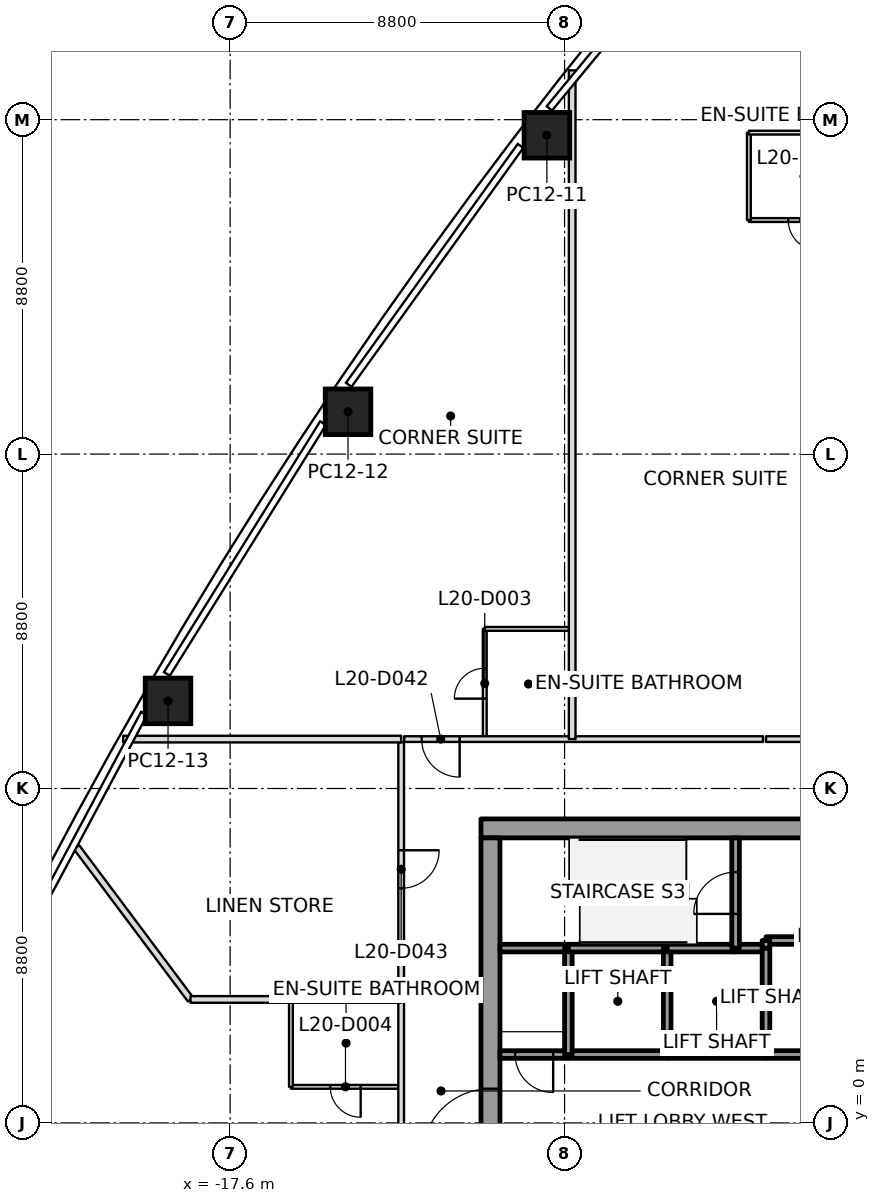
"""IFC4 building model, lengths in metres.
Left out: names, types, materials, properties, quantities, classifications, styles, units other than length and angle.
Written with IfcOpenShell. Run it as: python <this file> out.ifc"""

import sys

from ifc_helpers import new_model, si_unit, direction, frame, frame_2d, origin, origin_2d, place, context, subcontext, project, spatial, rectangle, extrude, element, fill, save


model = new_model("IFC4")
c1 = context("Model", 3, precision=1e-05, world=origin(), true_north=direction((0.0, 1.0)))
c2 = subcontext(c1, "Body", "Model", "MODEL_VIEW")
j1 = project(units=[si_unit("LENGTHUNIT", "METRE"), si_unit("PLANEANGLEUNIT", "RADIAN")], contexts=[c1])
p1 = place(None, origin())
s1 = spatial("IfcSite", under=j1, at=p1, CompositionType="ELEMENT")
p2 = place(p1, origin())
s2 = spatial("IfcBuilding", under=s1, at=p2, CompositionType="ELEMENT")
p3 = place(p2, frame((0.0, 0.0, 96.1)))
s3 = spatial("IfcBuildingStorey", under=s2, at=p3, CompositionType="ELEMENT", Elevation=96.1)
p4 = place(p3, frame((-9.265, 25.99, 0.0), z_axis=(0.00019790496, -0.022363260521, 0.999749891429), x_axis=(0.61047282483, 0.791841815333, 0.017591749055)))
e1 = element("IfcColumn", 1, at=p4, inside=s3, PredefinedType="COLUMN", context=c2, shape_type="SweptSolid", body=[
    extrude(rectangle(XDim=1.2, YDim=1.2, at=origin_2d()), origin(), (0.0, 0.0, 1.0), 3.701),
])
p5 = place(p3, frame((-14.498, 18.713, 0.0), z_axis=(0.005674016471, -0.014382971985, 0.999880460682), x_axis=(0.55645923647, 0.830828377567, 0.008793473571)))
e2 = element("IfcColumn", 2, at=p5, inside=s3, PredefinedType="COLUMN", context=c2, shape_type="SweptSolid", body=[
    extrude(rectangle(XDim=1.2, YDim=1.2, at=origin_2d()), origin(), (0.0, 0.0, 1.0), 3.7),
])
p6 = place(p3, frame((-19.234, 11.105, 0.0), z_axis=(0.010688725148, -0.006202099777, 0.999923639641), x_axis=(0.499971436973, 0.8660418936, 2.7223042e-05)))
e3 = element("IfcColumn", 3, at=p6, inside=s3, PredefinedType="COLUMN", context=c2, shape_type="SweptSolid", body=[
    extrude(rectangle(XDim=1.2, YDim=1.2, at=origin_2d()), origin(), (0.0, 0.0, 1.0), 3.7),
])
p7 = place(p3, frame((-11.0, 7.75, 0.0), z_axis=(0.0, 0.0, 1.0), x_axis=(1.0, 0.0, 0.0)))
e4 = element("IfcWall", 4, at=p7, inside=s3, PredefinedType="SHEAR", context=c2, shape_type="SweptSolid", body=[
    extrude(rectangle(XDim=22.0, YDim=0.5, at=frame_2d((11.0, 0.0))), origin(), (0.0, 0.0, 1.0), 3.7),
])
p8 = place(p7, frame((10.45, 0.0, 0.0)))
e5 = element("IfcOpeningElement", 5, at=p8, cuts=e4, PredefinedType="OPENING", context=c2, shape_type="SweptSolid", body=[
    extrude(rectangle(XDim=1.1, YDim=2.1, at=frame_2d((0.55, 1.05))), frame((0.0, 0.25, 0.0), z_axis=(0.0, -1.0, 0.0), x_axis=(1.0, 0.0, 0.0)), (0.0, 0.0, 1.0), 0.5),
])
p9 = place(p3, frame((-10.75, -7.5, 0.0), z_axis=(0.0, 0.0, 1.0), x_axis=(0.0, 1.0, 0.0)))
e6 = element("IfcWall", 6, at=p9, inside=s3, PredefinedType="SHEAR", context=c2, shape_type="SweptSolid", body=[
    extrude(rectangle(XDim=15.0, YDim=0.5, at=frame_2d((7.5, 0.0))), origin(), (0.0, 0.0, 1.0), 3.7),
])
p10 = place(p9, frame((6.6, 0.0, 0.0)))
e7 = element("IfcOpeningElement", 7, at=p10, cuts=e6, PredefinedType="OPENING", context=c2, shape_type="SweptSolid", body=[
    extrude(rectangle(XDim=1.8, YDim=2.1, at=frame_2d((0.9, 1.05))), frame((0.0, 0.25, 0.0), z_axis=(0.0, -1.0, 0.0), x_axis=(1.0, 0.0, 0.0)), (0.0, 0.0, 1.0), 0.5),
])
p11 = place(p3, frame((-8.7, 1.8, 0.0), z_axis=(0.0, 0.0, 1.0), x_axis=(-1.0, 0.0, 0.0)))
e8 = element("IfcWall", 8, at=p11, inside=s3, PredefinedType="SOLIDWALL", context=c2, shape_type="SweptSolid", body=[
    extrude(rectangle(XDim=1.8, YDim=0.2, at=frame_2d((0.9, 0.0))), origin(), (0.0, 0.0, 1.0), 3.55),
])
p12 = place(p11, frame((0.4, 0.0, 0.0)))
e9 = element("IfcOpeningElement", 9, at=p12, cuts=e8, PredefinedType="OPENING", context=c2, shape_type="SweptSolid", body=[
    extrude(rectangle(XDim=1.0, YDim=2.1, at=frame_2d((0.5, 1.05))), frame((0.0, 0.1, 0.0), z_axis=(0.0, -1.0, 0.0), x_axis=(1.0, 0.0, 0.0)), (0.0, 0.0, 1.0), 0.2),
])
p13 = place(p3, frame((-8.7, 4.6, 0.0), z_axis=(0.0, 0.0, 1.0), x_axis=(-1.0, 0.0, 0.0)))
e10 = element("IfcWall", 10, at=p13, inside=s3, PredefinedType="SOLIDWALL", context=c2, shape_type="SweptSolid", body=[
    extrude(rectangle(XDim=1.8, YDim=0.2, at=frame_2d((0.9, 0.0))), origin(), (0.0, 0.0, 1.0), 3.55),
])
p14 = place(p3, frame((-6.1, 1.8, 0.0), z_axis=(0.0, 0.0, 1.0), x_axis=(-1.0, 0.0, 0.0)))
e11 = element("IfcWall", 11, at=p14, inside=s3, PredefinedType="SOLIDWALL", context=c2, shape_type="SweptSolid", body=[
    extrude(rectangle(XDim=2.6, YDim=0.2, at=frame_2d((1.3, 0.0))), origin(), (0.0, 0.0, 1.0), 3.55),
])
p15 = place(p3, frame((-8.7, 1.8, 0.0), z_axis=(0.0, 0.0, 1.0), x_axis=(0.0, 1.0, 0.0)))
e12 = element("IfcWall", 12, at=p15, inside=s3, PredefinedType="SOLIDWALL", context=c2, shape_type="SweptSolid", body=[
    extrude(rectangle(XDim=2.8, YDim=0.2, at=frame_2d((1.4, 0.0))), origin(), (0.0, 0.0, 1.0), 3.55),
])
p16 = place(p3, frame((-6.1, 4.6, 0.0), z_axis=(0.0, 0.0, 1.0), x_axis=(-1.0, 0.0, 0.0)))
e13 = element("IfcWall", 13, at=p16, inside=s3, PredefinedType="SOLIDWALL", context=c2, shape_type="SweptSolid", body=[
    extrude(rectangle(XDim=2.6, YDim=0.2, at=frame_2d((1.3, 0.0))), origin(), (0.0, 0.0, 1.0), 3.55),
])
p17 = place(p3, frame((-3.5, 1.8, 0.0), z_axis=(0.0, 0.0, 1.0), x_axis=(-1.0, 0.0, 0.0)))
e14 = element("IfcWall", 14, at=p17, inside=s3, PredefinedType="SOLIDWALL", context=c2, shape_type="SweptSolid", body=[
    extrude(rectangle(XDim=2.6, YDim=0.2, at=frame_2d((1.3, 0.0))), origin(), (0.0, 0.0, 1.0), 3.55),
])
p18 = place(p3, frame((-6.1, 1.8, 0.0), z_axis=(0.0, 0.0, 1.0), x_axis=(0.0, 1.0, 0.0)))
e15 = element("IfcWall", 15, at=p18, inside=s3, PredefinedType="SOLIDWALL", context=c2, shape_type="SweptSolid", body=[
    extrude(rectangle(XDim=2.8, YDim=0.2, at=frame_2d((1.4, 0.0))), origin(), (0.0, 0.0, 1.0), 3.55),
])
p19 = place(p3, frame((-4.3, 4.6, 0.0), z_axis=(0.0, 0.0, 1.0), x_axis=(-1.0, 0.0, 0.0)))
e16 = element("IfcWall", 16, at=p19, inside=s3, PredefinedType="SOLIDWALL", context=c2, shape_type="SweptSolid", body=[
    extrude(rectangle(XDim=1.8, YDim=0.2, at=frame_2d((0.9, 0.0))), origin(), (0.0, 0.0, 1.0), 3.55),
])
p20 = place(p3, frame((-3.5, 4.6, 0.0), z_axis=(0.0, 0.0, 1.0), x_axis=(-1.0, 0.0, 0.0)))
e17 = element("IfcWall", 17, at=p20, inside=s3, PredefinedType="SOLIDWALL", context=c2, shape_type="SweptSolid", body=[
    extrude(rectangle(XDim=0.8, YDim=0.2, at=frame_2d((0.4, 0.0))), origin(), (0.0, 0.0, 1.0), 3.55),
])
p21 = place(p3, frame((-4.3, 4.6, 0.0), z_axis=(0.0, 0.0, 1.0), x_axis=(0.0, 1.0, 0.0)))
e18 = element("IfcWall", 18, at=p21, inside=s3, PredefinedType="SOLIDWALL", context=c2, shape_type="SweptSolid", body=[
    extrude(rectangle(XDim=2.9, YDim=0.2, at=frame_2d((1.45, 0.0))), origin(), (0.0, 0.0, 1.0), 3.55),
])
p22 = place(p21, frame((0.9, 0.0, 0.0)))
e19 = element("IfcOpeningElement", 19, at=p22, cuts=e18, PredefinedType="OPENING", context=c2, shape_type="SweptSolid", body=[
    extrude(rectangle(XDim=1.1, YDim=2.1, at=frame_2d((0.55, 1.05))), frame((0.0, 0.1, 0.0), z_axis=(0.0, -1.0, 0.0), x_axis=(1.0, 0.0, 0.0)), (0.0, 0.0, 1.0), 0.2),
])
p23 = place(p3, frame((-0.9, 1.8, 0.0), z_axis=(0.0, 0.0, 1.0), x_axis=(-1.0, 0.0, 0.0)))
e20 = element("IfcWall", 20, at=p23, inside=s3, PredefinedType="SOLIDWALL", context=c2, shape_type="SweptSolid", body=[
    extrude(rectangle(XDim=2.6, YDim=0.2, at=frame_2d((1.3, 0.0))), origin(), (0.0, 0.0, 1.0), 3.55),
])
p24 = place(p3, frame((-3.5, 4.6, 0.0), z_axis=(0.0, 0.0, 1.0), x_axis=(0.0, -1.0, 0.0)))
e21 = element("IfcWall", 21, at=p24, inside=s3, PredefinedType="SOLIDWALL", context=c2, shape_type="SweptSolid", body=[
    extrude(rectangle(XDim=2.8, YDim=0.2, at=frame_2d((1.4, 0.0))), origin(), (0.0, 0.0, 1.0), 3.55),
])
p25 = place(p3, frame((-0.9, 4.8, 0.0), z_axis=(0.0, 0.0, 1.0), x_axis=(-1.0, 0.0, 0.0)))
e22 = element("IfcWall", 22, at=p25, inside=s3, PredefinedType="SOLIDWALL", context=c2, shape_type="SweptSolid", body=[
    extrude(rectangle(XDim=2.6, YDim=0.2, at=frame_2d((1.3, 0.0))), origin(), (0.0, 0.0, 1.0), 3.55),
])
p26 = place(p3, frame((-3.5, 4.8, 0.0), z_axis=(0.0, 0.0, 1.0), x_axis=(0.0, -1.0, 0.0)))
e23 = element("IfcWall", 23, at=p26, inside=s3, PredefinedType="SOLIDWALL", context=c2, shape_type="SweptSolid", body=[
    extrude(rectangle(XDim=0.2, YDim=0.2, at=frame_2d((0.1, 0.0))), origin(), (0.0, 0.0, 1.0), 3.55),
])
p27 = place(p3, frame((-18.676, -9.57, 0.0), z_axis=(0.0, 0.0, 1.0), x_axis=(-0.500001872765, 0.86602432254, 0.0)))
e24 = element("IfcWall", 24, at=p27, inside=s3, PredefinedType="PARTITIONING", context=c2, shape_type="SweptSolid", body=[
    extrude(rectangle(XDim=12.555, YDim=0.175, at=frame_2d((6.278, 0.0))), origin(), (0.0, 0.0, 1.0), 2.934),
])
p28 = place(p3, frame((-21.644, 7.259, 0.0), z_axis=(0.0, 0.0, 1.0), x_axis=(0.599258893989, -0.800555293515, 0.0)))
e25 = element("IfcWall", 25, at=p28, inside=s3, PredefinedType="PARTITIONING", context=c2, shape_type="SweptSolid", body=[
    extrude(rectangle(XDim=5.009, YDim=0.175, at=frame_2d((2.504, 0.0))), origin(), (0.0, 0.0, 1.0), 2.934),
])
p29 = place(p3, frame((-18.643, 3.249, 0.0), z_axis=(0.0, 0.0, 1.0), x_axis=(1.0, 0.0, 0.0)))
e26 = element("IfcWall", 26, at=p29, inside=s3, PredefinedType="PARTITIONING", context=c2, shape_type="SweptSolid", body=[
    extrude(rectangle(XDim=5.542, YDim=0.175, at=frame_2d((2.771, 0.0))), origin(), (0.0, 0.0, 1.0), 3.093),
])
p30 = place(p3, frame((-13.1, 10.1, 0.0), z_axis=(0.0, 0.0, 1.0), x_axis=(-1.0, 0.0, 0.0)))
e27 = element("IfcWall", 27, at=p30, inside=s3, PredefinedType="PARTITIONING", context=c2, shape_type="SweptSolid", body=[
    extrude(rectangle(XDim=7.314, YDim=0.175, at=frame_2d((3.657, 0.0))), origin(), (0.0, 0.0, 1.0), 2.934),
])
p31 = place(p3, frame((-8.6, 10.1, 0.0), z_axis=(0.0, 0.0, 1.0), x_axis=(0.0, 1.0, 0.0)))
e28 = element("IfcWall", 28, at=p31, inside=s3, PredefinedType="PARTITIONING", context=c2, shape_type="SweptSolid", body=[
    extrude(rectangle(XDim=17.598, YDim=0.175, at=frame_2d((8.799, 0.0))), origin(), (0.0, 0.0, 1.0), 2.934),
])
p32 = place(p3, frame((-13.1, 10.02, 0.0), z_axis=(0.0, 0.0, 1.0), x_axis=(0.0, -1.0, 0.0)))
e29 = element("IfcWall", 29, at=p32, inside=s3, PredefinedType="PARTITIONING", context=c2, shape_type="SweptSolid", body=[
    extrude(rectangle(XDim=16.371, YDim=0.15, at=frame_2d((8.186, 0.0))), origin(), (0.0, 0.0, 1.0), 2.947),
])
p33 = place(p32, frame((2.845, 0.0, 0.0)))
e30 = element("IfcOpeningElement", 30, at=p33, cuts=e29, PredefinedType="OPENING", context=c2, shape_type="SweptSolid", body=[
    extrude(rectangle(XDim=1.0, YDim=2.1, at=frame_2d((0.5, 1.05))), frame((0.0, 0.075, 0.0), z_axis=(0.0, -1.0, 0.0), x_axis=(1.0, 0.0, 0.0)), (0.0, 0.0, 1.0), 0.15),
])
p34 = place(p32, frame((12.271, 0.0, 0.0)))
e31 = element("IfcOpeningElement", 31, at=p34, cuts=e29, PredefinedType="OPENING", context=c2, shape_type="SweptSolid", body=[
    extrude(rectangle(XDim=1.0, YDim=2.1, at=frame_2d((0.5, 1.05))), frame((0.0, 0.075, 0.0), z_axis=(0.0, -1.0, 0.0), x_axis=(1.0, 0.0, 0.0)), (0.0, 0.0, 1.0), 0.15),
])
p35 = place(p3, frame((-3.58, 10.1, 0.0), z_axis=(0.0, 0.0, 1.0), x_axis=(-1.0, 0.0, 0.0)))
e32 = element("IfcWall", 32, at=p35, inside=s3, PredefinedType="PARTITIONING", context=c2, shape_type="SweptSolid", body=[
    extrude(rectangle(XDim=9.44, YDim=0.15, at=frame_2d((4.72, 0.0))), origin(), (0.0, 0.0, 1.0), 2.947),
])
p36 = place(p35, frame((7.98, 0.0, 0.0)))
e33 = element("IfcOpeningElement", 33, at=p36, cuts=e32, PredefinedType="OPENING", context=c2, shape_type="SweptSolid", body=[
    extrude(rectangle(XDim=1.0, YDim=2.1, at=frame_2d((0.5, 1.05))), frame((0.0, 0.075, 0.0), z_axis=(0.0, -1.0, 0.0), x_axis=(1.0, 0.0, 0.0)), (0.0, 0.0, 1.0), 0.15),
])
p37 = place(p3, frame((-1.05, 10.1, 0.0), z_axis=(0.0, 0.0, 1.0), x_axis=(-1.0, 0.0, 0.0)))
e34 = element("IfcWall", 34, at=p37, inside=s3, PredefinedType="PARTITIONING", context=c2, shape_type="SweptSolid", body=[
    extrude(rectangle(XDim=2.45, YDim=0.15, at=frame_2d((1.225, 0.0))), origin(), (0.0, 0.0, 1.0), 3.15),
])
p38 = place(p3, frame((-13.13, 0.949, 0.0), z_axis=(0.0, 0.0, 1.0), x_axis=(-1.0, 0.0, 0.0)))
e35 = element("IfcWall", 35, at=p38, inside=s3, PredefinedType="PARTITIONING", context=c2, shape_type="SweptSolid", body=[
    extrude(rectangle(XDim=2.87, YDim=0.1, at=frame_2d((1.435, 0.0))), origin(), (0.0, 0.0, 1.0), 3.15),
])
p39 = place(p38, frame((1.035, 0.0, 0.0)))
e36 = element("IfcOpeningElement", 36, at=p39, cuts=e35, PredefinedType="OPENING", context=c2, shape_type="SweptSolid", body=[
    extrude(rectangle(XDim=0.8, YDim=2.1, at=frame_2d((0.4, 1.05))), frame((0.0, 0.05, 0.0), z_axis=(0.0, -1.0, 0.0), x_axis=(1.0, 0.0, 0.0)), (0.0, 0.0, 1.0), 0.1),
])
p40 = place(p3, frame((-16.0, 0.949, 0.0), z_axis=(0.0, 0.0, 1.0), x_axis=(0.0, 1.0, 0.0)))
e37 = element("IfcWall", 37, at=p40, inside=s3, PredefinedType="PARTITIONING", context=c2, shape_type="SweptSolid", body=[
    extrude(rectangle(XDim=2.27, YDim=0.1, at=frame_2d((1.135, 0.0))), origin(), (0.0, 0.0, 1.0), 3.15),
])
p41 = place(p3, frame((-10.9, 10.13, 0.0), z_axis=(0.0, 0.0, 1.0), x_axis=(0.0, 1.0, 0.0)))
e38 = element("IfcWall", 38, at=p41, inside=s3, PredefinedType="PARTITIONING", context=c2, shape_type="SweptSolid", body=[
    extrude(rectangle(XDim=2.87, YDim=0.1, at=frame_2d((1.435, 0.0))), origin(), (0.0, 0.0, 1.0), 2.947),
])
p42 = place(p41, frame((1.035, 0.0, 0.0)))
e39 = element("IfcOpeningElement", 39, at=p42, cuts=e38, PredefinedType="OPENING", context=c2, shape_type="SweptSolid", body=[
    extrude(rectangle(XDim=0.8, YDim=2.1, at=frame_2d((0.4, 1.05))), frame((0.0, 0.05, 0.0), z_axis=(0.0, -1.0, 0.0), x_axis=(1.0, 0.0, 0.0)), (0.0, 0.0, 1.0), 0.1),
])
p43 = place(p3, frame((-10.9, 13.0, 0.0), z_axis=(0.0, 0.0, 1.0), x_axis=(1.0, 0.0, 0.0)))
e40 = element("IfcWall", 40, at=p43, inside=s3, PredefinedType="PARTITIONING", context=c2, shape_type="SweptSolid", body=[
    extrude(rectangle(XDim=2.27, YDim=0.1, at=frame_2d((1.135, 0.0))), origin(), (0.0, 0.0, 1.0), 3.15),
])
p44 = place(p3, frame((-1.08, 23.759, 0.0), z_axis=(0.0, 0.0, 1.0), x_axis=(-1.0, 0.0, 0.0)))
e41 = element("IfcWall", 41, at=p44, inside=s3, PredefinedType="PARTITIONING", context=c2, shape_type="SweptSolid", body=[
    extrude(rectangle(XDim=2.87, YDim=0.1, at=frame_2d((1.435, 0.0))), origin(), (0.0, 0.0, 1.0), 3.15),
])
p45 = place(p44, frame((1.035, 0.0, 0.0)))
e42 = element("IfcOpeningElement", 42, at=p45, cuts=e41, PredefinedType="OPENING", context=c2, shape_type="SweptSolid", body=[
    extrude(rectangle(XDim=0.8, YDim=2.1, at=frame_2d((0.4, 1.05))), frame((0.0, 0.05, 0.0), z_axis=(0.0, -1.0, 0.0), x_axis=(1.0, 0.0, 0.0)), (0.0, 0.0, 1.0), 0.1),
])
p46 = place(p3, frame((-3.95, 23.759, 0.0), z_axis=(0.0, 0.0, 1.0), x_axis=(0.0, 1.0, 0.0)))
e43 = element("IfcWall", 43, at=p46, inside=s3, PredefinedType="PARTITIONING", context=c2, shape_type="SweptSolid", body=[
    extrude(rectangle(XDim=2.3, YDim=0.1, at=frame_2d((1.15, 0.0))), origin(), (0.0, 0.0, 1.0), 3.15),
])
p47 = place(p3, frame((-3.95, 26.059, 0.0), z_axis=(0.0, 0.0, 1.0), x_axis=(1.0, 0.0, 0.0)))
e44 = element("IfcWall", 44, at=p47, inside=s3, PredefinedType="PARTITIONING", context=c2, shape_type="SweptSolid", body=[
    extrude(rectangle(XDim=2.87, YDim=0.1, at=frame_2d((1.435, 0.0))), origin(), (0.0, 0.0, 1.0), 3.15),
])
p48 = place(p45, origin())
e45 = element("IfcDoor", 45, at=p48, inside=s3, OperationType="SINGLE_SWING_RIGHT", PredefinedType="DOOR", context=c2, shape_type="SweptSolid", body=[
    extrude(rectangle(XDim=0.8, YDim=2.1, at=frame_2d((0.4, 1.05))), frame((0.0, 0.025, 0.0), z_axis=(0.0, -1.0, 0.0), x_axis=(1.0, 0.0, 0.0)), (0.0, 0.0, 1.0), 0.05),
])
fill(e42, e45)
p49 = place(p36, origin())
e46 = element("IfcDoor", 46, at=p49, inside=s3, OperationType="SINGLE_SWING_RIGHT", PredefinedType="DOOR", context=c2, shape_type="SweptSolid", body=[
    extrude(rectangle(XDim=1.0, YDim=2.1, at=frame_2d((0.5, 1.05))), frame((0.0, 0.025, 0.0), z_axis=(0.0, -1.0, 0.0), x_axis=(1.0, 0.0, 0.0)), (0.0, 0.0, 1.0), 0.05),
])
fill(e33, e46)
p50 = place(p42, origin())
e47 = element("IfcDoor", 47, at=p50, inside=s3, OperationType="SINGLE_SWING_RIGHT", PredefinedType="DOOR", context=c2, shape_type="SweptSolid", body=[
    extrude(rectangle(XDim=0.8, YDim=2.1, at=frame_2d((0.4, 1.05))), frame((0.0, 0.025, 0.0), z_axis=(0.0, -1.0, 0.0), x_axis=(1.0, 0.0, 0.0)), (0.0, 0.0, 1.0), 0.05),
])
fill(e39, e47)
p51 = place(p33, origin())
e48 = element("IfcDoor", 48, at=p51, inside=s3, OperationType="SINGLE_SWING_LEFT", PredefinedType="DOOR", context=c2, shape_type="SweptSolid", body=[
    extrude(rectangle(XDim=1.0, YDim=2.1, at=frame_2d((0.5, 1.05))), frame((0.0, 0.025, 0.0), z_axis=(0.0, -1.0, 0.0), x_axis=(1.0, 0.0, 0.0)), (0.0, 0.0, 1.0), 0.05),
])
fill(e30, e48)
p52 = place(p39, origin())
e49 = element("IfcDoor", 49, at=p52, inside=s3, OperationType="SINGLE_SWING_RIGHT", PredefinedType="DOOR", context=c2, shape_type="SweptSolid", body=[
    extrude(rectangle(XDim=0.8, YDim=2.1, at=frame_2d((0.4, 1.05))), frame((0.0, 0.025, 0.0), z_axis=(0.0, -1.0, 0.0), x_axis=(1.0, 0.0, 0.0)), (0.0, 0.0, 1.0), 0.05),
])
fill(e36, e49)
p53 = place(p12, origin())
e50 = element("IfcDoor", 50, at=p53, inside=s3, OperationType="SINGLE_SWING_LEFT", PredefinedType="DOOR", context=c2, shape_type="SweptSolid", body=[
    extrude(rectangle(XDim=1.0, YDim=2.1, at=frame_2d((0.5, 1.05))), frame((0.0, 0.025, 0.0), z_axis=(0.0, -1.0, 0.0), x_axis=(1.0, 0.0, 0.0)), (0.0, 0.0, 1.0), 0.05),
])
fill(e9, e50)
p54 = place(p22, origin())
e51 = element("IfcDoor", 51, at=p54, inside=s3, OperationType="SINGLE_SWING_RIGHT", PredefinedType="DOOR", context=c2, shape_type="SweptSolid", body=[
    extrude(rectangle(XDim=1.1, YDim=2.1, at=frame_2d((0.55, 1.05))), frame((0.0, 0.025, 0.0), z_axis=(0.0, -1.0, 0.0), x_axis=(1.0, 0.0, 0.0)), (0.0, 0.0, 1.0), 0.05),
])
fill(e19, e51)
p55 = place(p10, origin())
e52 = element("IfcDoor", 52, at=p55, inside=s3, OperationType="DOUBLE_DOOR_SINGLE_SWING", PredefinedType="DOOR", context=c2, shape_type="SweptSolid", body=[
    extrude(rectangle(XDim=1.8, YDim=2.1, at=frame_2d((0.9, 1.05))), frame((0.0, 0.025, 0.0), z_axis=(0.0, -1.0, 0.0), x_axis=(1.0, 0.0, 0.0)), (0.0, 0.0, 1.0), 0.05),
])
fill(e7, e52)
save(model, sys.argv[1])
